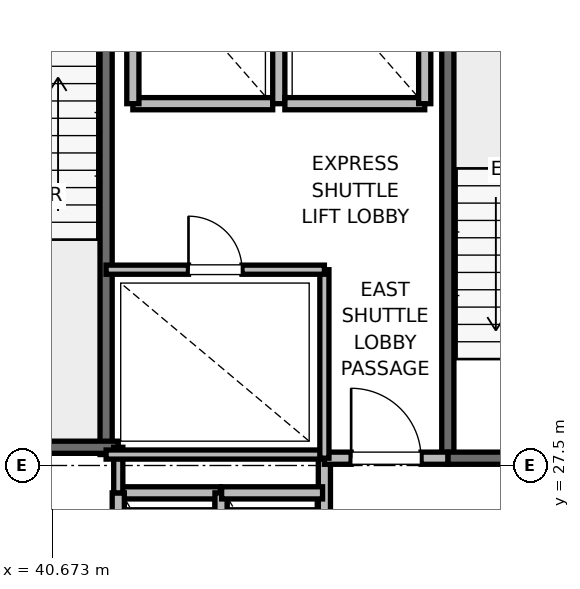
"""IFC4 building model, lengths in metres.
Left out: names, types, materials, properties, quantities, classifications, styles, units other than length and angle.
Written with IfcOpenShell. Run it as: python <this file> out.ifc"""

import sys

from ifc_helpers import new_model, si_unit, direction, frame, frame_2d, origin, place, context, subcontext, project, spatial, rectangle, extrude, element, fill, save


model = new_model("IFC4")
c1 = context("Model", 3, precision=1e-05, world=origin(), true_north=direction((0.0, 1.0)))
c2 = subcontext(c1, "Body", "Model", "MODEL_VIEW")
j1 = project(units=[si_unit("LENGTHUNIT", "METRE"), si_unit("PLANEANGLEUNIT", "RADIAN")], contexts=[c1])
p1 = place(None, origin())
s1 = spatial("IfcSite", under=j1, at=p1, CompositionType="ELEMENT")
p2 = place(p1, origin())
s2 = spatial("IfcBuilding", under=s1, at=p2, CompositionType="ELEMENT")
p3 = place(p2, frame((0.0, 0.0, 152.4)))
s3 = spatial("IfcBuildingStorey", under=s2, at=p3, CompositionType="ELEMENT", Elevation=152.4)
p4 = place(p3, frame((47.18, 27.62, 0.0), z_axis=(0.0, 0.0, 1.0), x_axis=(0.0, 1.0, 0.0)))
e1 = element("IfcWall", 1, at=p4, inside=s3, PredefinedType="SOLIDWALL", context=c2, shape_type="SweptSolid", body=[
    extrude(rectangle(XDim=8.18, YDim=0.2, at=frame_2d((4.09, 0.0))), origin(), (0.0, 0.0, 1.0), 3.775),
])
p5 = place(p3, frame((47.18, 27.62, 0.0), z_axis=(0.0, 0.0, 1.0), x_axis=(1.0, 0.0, 0.0)))
e2 = element("IfcWall", 2, at=p5, inside=s3, PredefinedType="SOLIDWALL", context=c2, shape_type="SweptSolid", body=[
    extrude(rectangle(XDim=3.12, YDim=0.2, at=frame_2d((1.56, 0.0))), origin(), (0.0, 0.0, 1.0), 3.775),
])
p6 = place(p5, frame((1.01, 0.0, 0.0)))
e3 = element("IfcOpeningElement", 3, at=p6, cuts=e2, PredefinedType="OPENING", context=c2, shape_type="SweptSolid", body=[
    extrude(rectangle(XDim=1.1, YDim=2.15, at=frame_2d((0.55, 1.075))), frame((0.0, 0.1, 0.0), z_axis=(0.0, -1.0, 0.0), x_axis=(1.0, 0.0, 0.0)), (0.0, 0.0, 1.0), 0.2),
])
p7 = place(p3, frame((41.56, 27.68, 0.0), z_axis=(0.0, 0.0, 1.0), x_axis=(0.0, 1.0, 0.0)))
e4 = element("IfcWall", 4, at=p7, inside=s3, PredefinedType="SOLIDWALL", context=c2, shape_type="SweptSolid", body=[
    extrude(rectangle(XDim=8.57, YDim=0.2, at=frame_2d((4.285, 0.0))), origin(), (0.0, 0.0, 1.0), 3.775),
])
p8 = place(p3, frame((38.44, 27.8, 0.0), z_axis=(0.0, 0.0, 1.0), x_axis=(1.0, 0.0, 0.0)))
e5 = element("IfcWall", 5, at=p8, inside=s3, PredefinedType="SOLIDWALL", context=c2, shape_type="SweptSolid", body=[
    extrude(rectangle(XDim=3.32, YDim=0.2, at=frame_2d((1.66, 0.0))), origin(), (0.0, 0.0, 1.0), 3.775),
])
p9 = place(p3, frame((45.15, 24.25, 0.0), z_axis=(0.0, 0.0, 1.0), x_axis=(0.0, 1.0, 0.0)))
e6 = element("IfcWall", 6, at=p9, inside=s3, PredefinedType="PARTITIONING", context=c2, shape_type="SweptSolid", body=[
    extrude(rectangle(XDim=3.37, YDim=0.2, at=frame_2d((1.685, 0.0))), origin(), (0.0, 0.0, 1.0), 3.775),
])
p10 = place(p3, frame((45.15, 27.62, 0.0), z_axis=(0.0, 0.0, 1.0), x_axis=(1.0, 0.0, 0.0)))
e7 = element("IfcWall", 7, at=p10, inside=s3, PredefinedType="PARTITIONING", context=c2, shape_type="SweptSolid", body=[
    extrude(rectangle(XDim=2.03, YDim=0.2, at=frame_2d((1.015, 0.0))), origin(), (0.0, 0.0, 1.0), 3.775),
])
p11 = place(p10, frame((0.44, 0.0, 0.0)))
e8 = element("IfcOpeningElement", 8, at=p11, cuts=e7, PredefinedType="OPENING", context=c2, shape_type="SweptSolid", body=[
    extrude(rectangle(XDim=1.15, YDim=2.2, at=frame_2d((0.575, 1.1))), frame((0.0, 0.1, 0.0), z_axis=(0.0, -1.0, 0.0), x_axis=(1.0, 0.0, 0.0)), (0.0, 0.0, 1.0), 0.2),
])
p12 = place(p3, frame((43.44, 27.05, 0.0), z_axis=(0.0, 0.0, 1.0), x_axis=(-1.0, 0.0, 0.0)))
e9 = element("IfcWall", 9, at=p12, inside=s3, PredefinedType="SOLIDWALL", context=c2, shape_type="SweptSolid", body=[
    extrude(rectangle(XDim=1.68, YDim=0.2, at=frame_2d((0.84, 0.0))), origin(), (0.0, 0.0, 1.0), 3.775),
])
for number, where, z_axis, x_axis in (
    (10, (41.76, 27.05, 0.0), (0.0, 0.0, 1.0), (0.0, -1.0, 0.0)),
    (11, (43.45, 24.45, 0.0), (0.0, 0.0, 1.0), (0.0, 1.0, 0.0)),
):
    element("IfcWall", number, at=place(p3, frame(where, z_axis=z_axis, x_axis=x_axis)), inside=s3, PredefinedType="SOLIDWALL", context=c2, shape_type="SweptSolid", body=[
        extrude(rectangle(XDim=2.6, YDim=0.2, at=frame_2d((1.3, 0.0))), origin(), (0.0, 0.0, 1.0), 3.775),
    ])
p13 = place(p3, frame((45.12, 27.05, 0.0), z_axis=(0.0, 0.0, 1.0), x_axis=(-1.0, 0.0, 0.0)))
e12 = element("IfcWall", 12, at=p13, inside=s3, PredefinedType="SOLIDWALL", context=c2, shape_type="SweptSolid", body=[
    extrude(rectangle(XDim=1.66, YDim=0.2, at=frame_2d((0.83, 0.0))), origin(), (0.0, 0.0, 1.0), 3.775),
])
p14 = place(p3, frame((42.0, 33.45, 0.0), z_axis=(0.0, 0.0, 1.0), x_axis=(1.0, 0.0, 0.0)))
e13 = element("IfcWall", 13, at=p14, inside=s3, PredefinedType="SOLIDWALL", context=c2, shape_type="SweptSolid", body=[
    extrude(rectangle(XDim=2.3, YDim=0.2, at=frame_2d((1.15, 0.0))), origin(), (0.0, 0.0, 1.0), 3.775),
])
for number, where, z_axis, x_axis in (
    (14, (42.0, 36.05, 0.0), (0.0, 0.0, 1.0), (0.0, -1.0, 0.0)),
    (15, (44.4, 33.45, 0.0), (0.0, 0.0, 1.0), (0.0, 1.0, 0.0)),
):
    element("IfcWall", number, at=place(p3, frame(where, z_axis=z_axis, x_axis=x_axis)), inside=s3, PredefinedType="SOLIDWALL", context=c2, shape_type="SweptSolid", body=[
        extrude(rectangle(XDim=2.6, YDim=0.2, at=frame_2d((1.3, 0.0))), origin(), (0.0, 0.0, 1.0), 2.755),
    ])
p15 = place(p3, frame((44.5, 33.45, 0.0), z_axis=(0.0, 0.0, 1.0), x_axis=(1.0, 0.0, 0.0)))
e16 = element("IfcWall", 16, at=p15, inside=s3, PredefinedType="SOLIDWALL", context=c2, shape_type="SweptSolid", body=[
    extrude(rectangle(XDim=2.3, YDim=0.2, at=frame_2d((1.15, 0.0))), origin(), (0.0, 0.0, 1.0), 3.775),
])
p16 = place(p3, frame((46.8, 33.45, 0.0), z_axis=(0.0, 0.0, 1.0), x_axis=(0.0, 1.0, 0.0)))
e17 = element("IfcWall", 17, at=p16, inside=s3, PredefinedType="SOLIDWALL", context=c2, shape_type="SweptSolid", body=[
    extrude(rectangle(XDim=2.6, YDim=0.2, at=frame_2d((1.3, 0.0))), origin(), (0.0, 0.0, 1.0), 3.775),
])
p17 = place(p3, frame((41.76, 27.05, 0.0), z_axis=(0.0, 0.0, 1.0), x_axis=(0.0, 1.0, 0.0)))
e18 = element("IfcWall", 18, at=p17, inside=s3, PredefinedType="PARTITIONING", context=c2, shape_type="SweptSolid", body=[
    extrude(rectangle(XDim=0.75, YDim=0.15, at=frame_2d((0.375, 0.0))), origin(), (0.0, 0.0, 1.0), 2.85),
])
p18 = place(p3, frame((41.56, 27.68, 0.0), z_axis=(0.0, 0.0, 1.0), x_axis=(1.0, 0.0, 0.0)))
e19 = element("IfcWall", 19, at=p18, inside=s3, PredefinedType="PARTITIONING", context=c2, shape_type="SweptSolid", body=[
    extrude(rectangle(XDim=3.59, YDim=0.15, at=frame_2d((1.795, 0.0))), origin(), (0.0, 0.0, 1.0), 2.85),
])
p19 = place(p3, frame((45.15, 27.62, 0.0), z_axis=(0.0, 0.0, 1.0), x_axis=(0.0, 1.0, 0.0)))
e20 = element("IfcWall", 20, at=p19, inside=s3, PredefinedType="PARTITIONING", context=c2, shape_type="SweptSolid", body=[
    extrude(rectangle(XDim=3.1, YDim=0.15, at=frame_2d((1.55, 0.0))), origin(), (0.0, 0.0, 1.0), 2.85),
])
p20 = place(p3, frame((41.56, 30.72, 0.0), z_axis=(0.0, 0.0, 1.0), x_axis=(1.0, 0.0, 0.0)))
e21 = element("IfcWall", 21, at=p20, inside=s3, PredefinedType="PARTITIONING", context=c2, shape_type="SweptSolid", body=[
    extrude(rectangle(XDim=3.59, YDim=0.15, at=frame_2d((1.795, 0.0))), origin(), (0.0, 0.0, 1.0), 2.85),
])
p21 = place(p20, frame((1.355, 0.0, 0.0)))
e22 = element("IfcOpeningElement", 22, at=p21, cuts=e21, PredefinedType="OPENING", context=c2, shape_type="SweptSolid", body=[
    extrude(rectangle(XDim=0.88, YDim=2.1, at=frame_2d((0.44, 1.05))), frame((0.0, 0.075, 0.0), z_axis=(0.0, -1.0, 0.0), x_axis=(1.0, 0.0, 0.0)), (0.0, 0.0, 1.0), 0.15),
])
p22 = place(p11, origin())
e23 = element("IfcDoor", 23, at=p22, inside=s3, OperationType="SINGLE_SWING_LEFT", PredefinedType="DOOR", context=c2, shape_type="SweptSolid", body=[
    extrude(rectangle(XDim=1.15, YDim=2.2, at=frame_2d((0.575, 1.1))), frame((0.0, 0.025, 0.0), z_axis=(0.0, -1.0, 0.0), x_axis=(1.0, 0.0, 0.0)), (0.0, 0.0, 1.0), 0.05),
])
fill(e8, e23)
p23 = place(p21, origin())
e24 = element("IfcDoor", 24, at=p23, inside=s3, OperationType="SINGLE_SWING_LEFT", PredefinedType="DOOR", context=c2, shape_type="SweptSolid", body=[
    extrude(rectangle(XDim=0.88, YDim=2.1, at=frame_2d((0.44, 1.05))), frame((0.0, 0.025, 0.0), z_axis=(0.0, -1.0, 0.0), x_axis=(1.0, 0.0, 0.0)), (0.0, 0.0, 1.0), 0.05),
])
fill(e22, e24)
save(model, sys.argv[1])
